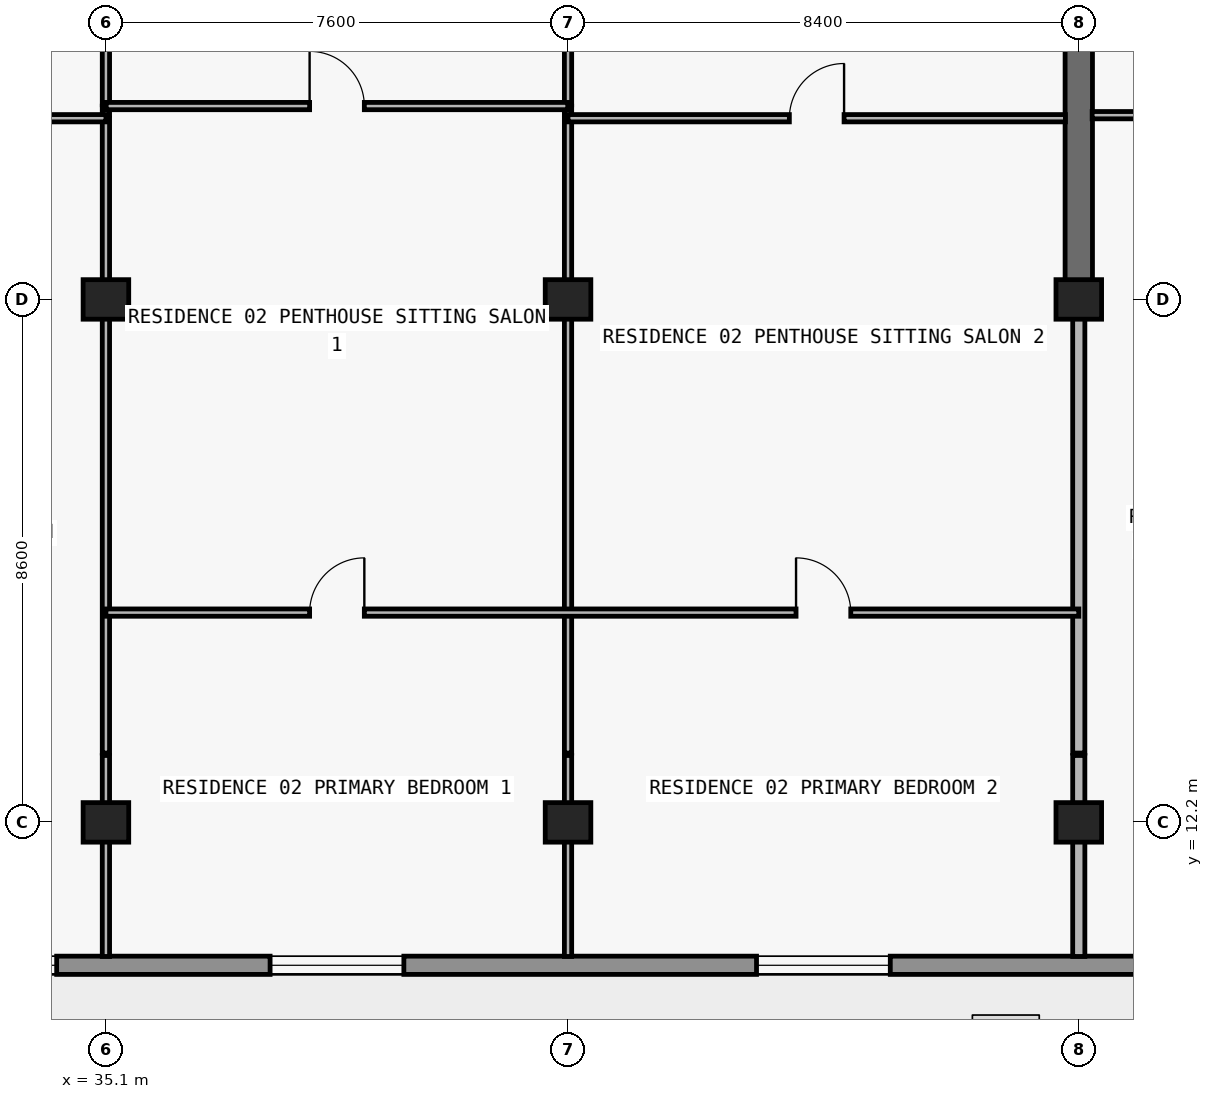
"""IFC4 building model, lengths in metres.
Left out: names, types, materials, properties, quantities, classifications, styles, units other than length and angle.
Written with IfcOpenShell. Run it as: python <this file> out.ifc"""

import sys

from ifc_helpers import new_model, si_unit, direction, frame, frame_2d, origin, origin_2d, place, context, subcontext, project, spatial, rectangle, extrude, element, fill, save


model = new_model("IFC4")
c1 = context("Model", 3, precision=1e-05, world=origin(), true_north=direction((0.0, 1.0)))
c2 = subcontext(c1, "Body", "Model", "MODEL_VIEW")
j1 = project(units=[si_unit("LENGTHUNIT", "METRE"), si_unit("PLANEANGLEUNIT", "RADIAN")], contexts=[c1])
p1 = place(None, origin())
s1 = spatial("IfcSite", under=j1, at=p1, CompositionType="ELEMENT")
p2 = place(p1, origin())
s2 = spatial("IfcBuilding", under=s1, at=p2, CompositionType="ELEMENT")
p3 = place(p2, frame((0.0, 0.0, 256.2)))
s3 = spatial("IfcBuildingStorey", under=s2, at=p3, CompositionType="ELEMENT", Elevation=256.2)
for number, where, z_axis, x_axis in (
    (1, (35.1, 12.2, 0.0), (0.0, 0.0, 1.0), (1.0, 0.0, 0.0)),
    (2, (42.7, 12.2, 0.0), (0.0, 0.0, 1.0), (1.0, 0.0, 0.0)),
    (3, (51.1, 12.2, 0.0), (0.0, 0.0, 1.0), (1.0, 0.0, 0.0)),
    (4, (35.1, 20.8, 0.0), (0.0, 0.0, 1.0), (1.0, 0.0, 0.0)),
    (5, (42.7, 20.8, 0.0), (0.0, 0.0, 1.0), (1.0, 0.0, 0.0)),
    (6, (51.1, 20.8, 0.0), (0.0, 0.0, 1.0), (1.0, 0.0, 0.0)),
):
    element("IfcColumn", number, at=place(p3, frame(where, z_axis=z_axis, x_axis=x_axis)), inside=s3, PredefinedType="COLUMN", context=c2, shape_type="SweptSolid", body=[
        extrude(rectangle(XDim=0.75, YDim=0.65, at=origin_2d()), origin(), (0.0, 0.0, 1.0), 3.05),
    ])
p4 = place(p3, frame((51.1, 20.8, 0.0), z_axis=(0.0, 0.0, 1.0), x_axis=(0.0, 1.0, 0.0)))
e7 = element("IfcWall", 7, at=p4, inside=s3, PredefinedType="SHEAR", context=c2, shape_type="SweptSolid", body=[
    extrude(rectangle(XDim=8.6, YDim=0.45, at=frame_2d((4.3, 0.0))), origin(), (0.0, 0.0, 1.0), 3.05),
])
p5 = place(p3, frame((65.7, 9.85, 0.0), z_axis=(0.0, 0.0, 1.0), x_axis=(-1.0, 0.0, 0.0)))
e8 = element("IfcWall", 8, at=p5, inside=s3, PredefinedType="STANDARD", context=c2, shape_type="SweptSolid", body=[
    extrude(rectangle(XDim=53.6, YDim=0.3, at=frame_2d((26.8, 0.0))), origin(), (0.0, 0.0, 1.0), 3.05),
])
p6 = place(p5, frame((49.5, 0.0, 0.0)))
e9 = element("IfcOpeningElement", 9, at=p6, cuts=e8, PredefinedType="OPENING", context=c2, shape_type="SweptSolid", body=[
    extrude(rectangle(XDim=2.0, YDim=2.3, at=frame_2d((1.0, 1.15))), frame((0.0, 0.16, 0.0), z_axis=(0.0, -1.0, 0.0), x_axis=(1.0, 0.0, 0.0)), (0.0, 0.0, 1.0), 0.32),
])
p7 = place(p5, frame((42.1, 0.0, 0.85)))
e10 = element("IfcOpeningElement", 10, at=p7, cuts=e8, PredefinedType="OPENING", context=c2, shape_type="SweptSolid", body=[
    extrude(rectangle(XDim=2.2, YDim=1.55, at=frame_2d((1.1, 0.775))), frame((0.0, 0.16, 0.0), z_axis=(0.0, -1.0, 0.0), x_axis=(1.0, 0.0, 0.0)), (0.0, 0.0, 1.0), 0.32),
])
p8 = place(p5, frame((36.09, 0.0, 0.0)))
e11 = element("IfcOpeningElement", 11, at=p8, cuts=e8, PredefinedType="OPENING", context=c2, shape_type="SweptSolid", body=[
    extrude(rectangle(XDim=2.0, YDim=2.3, at=frame_2d((1.0, 1.15))), frame((0.0, 0.16, 0.0), z_axis=(0.0, -1.0, 0.0), x_axis=(1.0, 0.0, 0.0)), (0.0, 0.0, 1.0), 0.32),
])
p9 = place(p5, frame((31.41, 0.0, 0.65)))
e12 = element("IfcOpeningElement", 12, at=p9, cuts=e8, PredefinedType="OPENING", context=c2, shape_type="SweptSolid", body=[
    extrude(rectangle(XDim=2.6, YDim=1.85, at=frame_2d((1.3, 0.925))), frame((0.0, 0.16, 0.0), z_axis=(0.0, -1.0, 0.0), x_axis=(1.0, 0.0, 0.0)), (0.0, 0.0, 1.0), 0.32),
])
p10 = place(p5, frame((25.7, 0.0, 0.85)))
e13 = element("IfcOpeningElement", 13, at=p10, cuts=e8, PredefinedType="OPENING", context=c2, shape_type="SweptSolid", body=[
    extrude(rectangle(XDim=2.2, YDim=1.55, at=frame_2d((1.1, 0.775))), frame((0.0, 0.16, 0.0), z_axis=(0.0, -1.0, 0.0), x_axis=(1.0, 0.0, 0.0)), (0.0, 0.0, 1.0), 0.32),
])
p11 = place(p5, frame((17.7, 0.0, 0.85)))
e14 = element("IfcOpeningElement", 14, at=p11, cuts=e8, PredefinedType="OPENING", context=c2, shape_type="SweptSolid", body=[
    extrude(rectangle(XDim=2.2, YDim=1.55, at=frame_2d((1.1, 0.775))), frame((0.0, 0.16, 0.0), z_axis=(0.0, -1.0, 0.0), x_axis=(1.0, 0.0, 0.0)), (0.0, 0.0, 1.0), 0.32),
])
p12 = place(p5, frame((11.626, 0.0, 0.0)))
e15 = element("IfcOpeningElement", 15, at=p12, cuts=e8, PredefinedType="OPENING", context=c2, shape_type="SweptSolid", body=[
    extrude(rectangle(XDim=2.0, YDim=2.3, at=frame_2d((1.0, 1.15))), frame((0.0, 0.16, 0.0), z_axis=(0.0, -1.0, 0.0), x_axis=(1.0, 0.0, 0.0)), (0.0, 0.0, 1.0), 0.32),
])
p13 = place(p5, frame((7.326, 0.0, 0.85)))
e16 = element("IfcOpeningElement", 16, at=p13, cuts=e8, PredefinedType="OPENING", context=c2, shape_type="SweptSolid", body=[
    extrude(rectangle(XDim=2.2, YDim=1.55, at=frame_2d((1.1, 0.775))), frame((0.0, 0.16, 0.0), z_axis=(0.0, -1.0, 0.0), x_axis=(1.0, 0.0, 0.0)), (0.0, 0.0, 1.0), 0.32),
])
p14 = place(p3, frame((35.1, 9.995, 0.0), z_axis=(0.0, 0.0, 1.0), x_axis=(0.0, 1.0, 0.0)))
e17 = element("IfcWall", 17, at=p14, inside=s3, PredefinedType="PARTITIONING", context=c2, shape_type="SweptSolid", body=[
    extrude(rectangle(XDim=3.305, YDim=0.12, at=frame_2d((1.652, 0.0))), origin(), (0.0, 0.0, 1.0), 2.263),
])
p15 = place(p3, frame((35.1, 13.34, 0.0), z_axis=(0.0, 0.0, 1.0), x_axis=(0.0, 1.0, 0.0)))
e18 = element("IfcWall", 18, at=p15, inside=s3, PredefinedType="PARTITIONING", context=c2, shape_type="SweptSolid", body=[
    extrude(rectangle(XDim=10.44, YDim=0.12, at=frame_2d((5.22, 0.0))), origin(), (0.0, 0.0, 1.0), 2.263),
])
p16 = place(p3, frame((35.1, 23.83, 0.0), z_axis=(0.0, 0.0, 1.0), x_axis=(0.0, 1.0, 0.0)))
e19 = element("IfcWall", 19, at=p16, inside=s3, PredefinedType="PARTITIONING", context=c2, shape_type="SweptSolid", body=[
    extrude(rectangle(XDim=0.15, YDim=0.12, at=frame_2d((0.075, 0.0))), origin(), (0.0, 0.0, 1.0), 2.263),
])
p17 = place(p3, frame((35.1, 24.0, 0.0), z_axis=(0.0, 0.0, 1.0), x_axis=(0.0, 1.0, 0.0)))
e20 = element("IfcWall", 20, at=p17, inside=s3, PredefinedType="PARTITIONING", context=c2, shape_type="SweptSolid", body=[
    extrude(rectangle(XDim=4.58, YDim=0.12, at=frame_2d((2.29, 0.0))), origin(), (0.0, 0.0, 1.0), 2.263),
])
p18 = place(p17, frame((1.74, 0.0, 0.0)))
e21 = element("IfcOpeningElement", 21, at=p18, cuts=e20, PredefinedType="OPENING", context=c2, shape_type="SweptSolid", body=[
    extrude(rectangle(XDim=0.9, YDim=2.15, at=frame_2d((0.45, 1.075))), frame((0.0, 0.07, 0.0), z_axis=(0.0, -1.0, 0.0), x_axis=(1.0, 0.0, 0.0)), (0.0, 0.0, 1.0), 0.14),
])
p19 = place(p3, frame((42.7, 9.995, 0.0), z_axis=(0.0, 0.0, 1.0), x_axis=(0.0, 1.0, 0.0)))
e22 = element("IfcWall", 22, at=p19, inside=s3, PredefinedType="PARTITIONING", context=c2, shape_type="SweptSolid", body=[
    extrude(rectangle(XDim=3.305, YDim=0.12, at=frame_2d((1.652, 0.0))), origin(), (0.0, 0.0, 1.0), 2.263),
])
p20 = place(p3, frame((42.7, 13.34, 0.0), z_axis=(0.0, 0.0, 1.0), x_axis=(0.0, 1.0, 0.0)))
e23 = element("IfcWall", 23, at=p20, inside=s3, PredefinedType="PARTITIONING", context=c2, shape_type="SweptSolid", body=[
    extrude(rectangle(XDim=10.44, YDim=0.12, at=frame_2d((5.22, 0.0))), origin(), (0.0, 0.0, 1.0), 2.263),
])
p21 = place(p3, frame((42.7, 23.83, 0.0), z_axis=(0.0, 0.0, 1.0), x_axis=(0.0, 1.0, 0.0)))
e24 = element("IfcWall", 24, at=p21, inside=s3, PredefinedType="PARTITIONING", context=c2, shape_type="SweptSolid", body=[
    extrude(rectangle(XDim=0.15, YDim=0.12, at=frame_2d((0.075, 0.0))), origin(), (0.0, 0.0, 1.0), 2.263),
])
p22 = place(p3, frame((42.7, 24.0, 0.0), z_axis=(0.0, 0.0, 1.0), x_axis=(0.0, 1.0, 0.0)))
e25 = element("IfcWall", 25, at=p22, inside=s3, PredefinedType="PARTITIONING", context=c2, shape_type="SweptSolid", body=[
    extrude(rectangle(XDim=4.58, YDim=0.12, at=frame_2d((2.29, 0.0))), origin(), (0.0, 0.0, 1.0), 2.263),
])
p23 = place(p22, frame((1.74, 0.0, 0.0)))
e26 = element("IfcOpeningElement", 26, at=p23, cuts=e25, PredefinedType="OPENING", context=c2, shape_type="SweptSolid", body=[
    extrude(rectangle(XDim=0.9, YDim=2.15, at=frame_2d((0.45, 1.075))), frame((0.0, 0.07, 0.0), z_axis=(0.0, -1.0, 0.0), x_axis=(1.0, 0.0, 0.0)), (0.0, 0.0, 1.0), 0.14),
])
p24 = place(p3, frame((51.1, 9.995, 0.0), z_axis=(0.0, 0.0, 1.0), x_axis=(0.0, 1.0, 0.0)))
e27 = element("IfcWall", 27, at=p24, inside=s3, PredefinedType="PARTITIONING", context=c2, shape_type="SweptSolid", body=[
    extrude(rectangle(XDim=3.305, YDim=0.2, at=frame_2d((1.652, 0.0))), origin(), (0.0, 0.0, 1.0), 2.263),
])
p25 = place(p3, frame((51.1, 13.34, 0.0), z_axis=(0.0, 0.0, 1.0), x_axis=(0.0, 1.0, 0.0)))
e28 = element("IfcWall", 28, at=p25, inside=s3, PredefinedType="PARTITIONING", context=c2, shape_type="SweptSolid", body=[
    extrude(rectangle(XDim=7.455, YDim=0.2, at=frame_2d((3.728, 0.0))), origin(), (0.0, 0.0, 1.0), 2.263),
])
p26 = place(p3, frame((35.1, 15.65, 0.0), z_axis=(0.0, 0.0, 1.0), x_axis=(1.0, 0.0, 0.0)))
e29 = element("IfcWall", 29, at=p26, inside=s3, PredefinedType="PARTITIONING", context=c2, shape_type="SweptSolid", body=[
    extrude(rectangle(XDim=16.0, YDim=0.12, at=frame_2d((8.0, 0.0))), origin(), (0.0, 0.0, 1.0), 3.05),
])
p27 = place(p26, frame((3.35, 0.0, 0.0)))
e30 = element("IfcOpeningElement", 30, at=p27, cuts=e29, PredefinedType="OPENING", context=c2, shape_type="SweptSolid", body=[
    extrude(rectangle(XDim=0.9, YDim=2.15, at=frame_2d((0.45, 1.075))), frame((0.0, 0.07, 0.0), z_axis=(0.0, -1.0, 0.0), x_axis=(1.0, 0.0, 0.0)), (0.0, 0.0, 1.0), 0.14),
])
p28 = place(p26, frame((11.35, 0.0, 0.0)))
e31 = element("IfcOpeningElement", 31, at=p28, cuts=e29, PredefinedType="OPENING", context=c2, shape_type="SweptSolid", body=[
    extrude(rectangle(XDim=0.9, YDim=2.15, at=frame_2d((0.45, 1.075))), frame((0.0, 0.07, 0.0), z_axis=(0.0, -1.0, 0.0), x_axis=(1.0, 0.0, 0.0)), (0.0, 0.0, 1.0), 0.14),
])
p29 = place(p3, frame((26.92, 23.78, 0.0), z_axis=(0.0, 0.0, 1.0), x_axis=(1.0, 0.0, 0.0)))
e32 = element("IfcWall", 32, at=p29, inside=s3, PredefinedType="PARTITIONING", context=c2, shape_type="SweptSolid", body=[
    extrude(rectangle(XDim=8.18, YDim=0.12, at=frame_2d((4.09, 0.0))), origin(), (0.0, 0.0, 1.0), 3.05),
])
p30 = place(p29, frame((1.204, 0.0, 0.0)))
e33 = element("IfcOpeningElement", 33, at=p30, cuts=e32, PredefinedType="OPENING", context=c2, shape_type="SweptSolid", body=[
    extrude(rectangle(XDim=0.9, YDim=2.15, at=frame_2d((0.45, 1.075))), frame((0.0, 0.07, 0.0), z_axis=(0.0, -1.0, 0.0), x_axis=(1.0, 0.0, 0.0)), (0.0, 0.0, 1.0), 0.14),
])
p31 = place(p3, frame((42.7, 23.78, 0.0), z_axis=(0.0, 0.0, 1.0), x_axis=(1.0, 0.0, 0.0)))
e34 = element("IfcWall", 34, at=p31, inside=s3, PredefinedType="PARTITIONING", context=c2, shape_type="SweptSolid", body=[
    extrude(rectangle(XDim=8.18, YDim=0.12, at=frame_2d((4.09, 0.0))), origin(), (0.0, 0.0, 1.0), 3.05),
])
p32 = place(p31, frame((3.64, 0.0, 0.0)))
e35 = element("IfcOpeningElement", 35, at=p32, cuts=e34, PredefinedType="OPENING", context=c2, shape_type="SweptSolid", body=[
    extrude(rectangle(XDim=0.9, YDim=2.15, at=frame_2d((0.45, 1.075))), frame((0.0, 0.07, 0.0), z_axis=(0.0, -1.0, 0.0), x_axis=(1.0, 0.0, 0.0)), (0.0, 0.0, 1.0), 0.14),
])
p33 = place(p3, frame((51.32, 23.83, 0.0), z_axis=(0.0, 0.0, 1.0), x_axis=(1.0, 0.0, 0.0)))
e36 = element("IfcWall", 36, at=p33, inside=s3, PredefinedType="PARTITIONING", context=c2, shape_type="SweptSolid", body=[
    extrude(rectangle(XDim=8.18, YDim=0.12, at=frame_2d((4.09, 0.0))), origin(), (0.0, 0.0, 1.0), 3.05),
])
p34 = place(p33, frame((1.414, 0.0, 0.0)))
e37 = element("IfcOpeningElement", 37, at=p34, cuts=e36, PredefinedType="OPENING", context=c2, shape_type="SweptSolid", body=[
    extrude(rectangle(XDim=0.9, YDim=2.15, at=frame_2d((0.45, 1.075))), frame((0.0, 0.07, 0.0), z_axis=(0.0, -1.0, 0.0), x_axis=(1.0, 0.0, 0.0)), (0.0, 0.0, 1.0), 0.14),
])
p35 = place(p33, frame((5.798, 0.0, 0.0)))
e38 = element("IfcOpeningElement", 38, at=p35, cuts=e36, PredefinedType="OPENING", context=c2, shape_type="SweptSolid", body=[
    extrude(rectangle(XDim=0.9, YDim=2.15, at=frame_2d((0.45, 1.075))), frame((0.0, 0.07, 0.0), z_axis=(0.0, -1.0, 0.0), x_axis=(1.0, 0.0, 0.0)), (0.0, 0.0, 1.0), 0.14),
])
p36 = place(p3, frame((35.105, 23.98, 0.0), z_axis=(0.0, 0.0, 1.0), x_axis=(1.0, 0.0, 0.0)))
e39 = element("IfcWall", 39, at=p36, inside=s3, PredefinedType="PARTITIONING", context=c2, shape_type="SweptSolid", body=[
    extrude(rectangle(XDim=7.59, YDim=0.12, at=frame_2d((3.795, 0.0))), origin(), (0.0, 0.0, 1.0), 3.05),
])
p37 = place(p36, frame((3.345, 0.0, 0.0)))
e40 = element("IfcOpeningElement", 40, at=p37, cuts=e39, PredefinedType="OPENING", context=c2, shape_type="SweptSolid", body=[
    extrude(rectangle(XDim=0.9, YDim=2.15, at=frame_2d((0.45, 1.075))), frame((0.0, 0.07, 0.0), z_axis=(0.0, -1.0, 0.0), x_axis=(1.0, 0.0, 0.0)), (0.0, 0.0, 1.0), 0.14),
])
p38 = place(p9, origin())
e41 = element("IfcWindow", 41, at=p38, inside=s3, PartitioningType="SINGLE_PANEL", PredefinedType="WINDOW", context=c2, shape_type="SweptSolid", body=[
    extrude(rectangle(XDim=2.6, YDim=1.85, at=frame_2d((1.3, 0.925))), frame((0.0, 0.03, 0.0), z_axis=(0.0, -1.0, 0.0), x_axis=(1.0, 0.0, 0.0)), (0.0, 0.0, 1.0), 0.06),
])
fill(e12, e41)
p39 = place(p10, origin())
e42 = element("IfcWindow", 42, at=p39, inside=s3, PartitioningType="SINGLE_PANEL", PredefinedType="WINDOW", context=c2, shape_type="SweptSolid", body=[
    extrude(rectangle(XDim=2.2, YDim=1.55, at=frame_2d((1.1, 0.775))), frame((0.0, 0.03, 0.0), z_axis=(0.0, -1.0, 0.0), x_axis=(1.0, 0.0, 0.0)), (0.0, 0.0, 1.0), 0.06),
])
fill(e13, e42)
p40 = place(p11, origin())
e43 = element("IfcWindow", 43, at=p40, inside=s3, PartitioningType="SINGLE_PANEL", PredefinedType="WINDOW", context=c2, shape_type="SweptSolid", body=[
    extrude(rectangle(XDim=2.2, YDim=1.55, at=frame_2d((1.1, 0.775))), frame((0.0, 0.03, 0.0), z_axis=(0.0, -1.0, 0.0), x_axis=(1.0, 0.0, 0.0)), (0.0, 0.0, 1.0), 0.06),
])
fill(e14, e43)
p41 = place(p37, origin())
e44 = element("IfcDoor", 44, at=p41, inside=s3, OperationType="SINGLE_SWING_LEFT", PredefinedType="DOOR", context=c2, shape_type="SweptSolid", body=[
    extrude(rectangle(XDim=0.9, YDim=2.15, at=frame_2d((0.45, 1.075))), frame((0.0, 0.025, 0.0), z_axis=(0.0, -1.0, 0.0), x_axis=(1.0, 0.0, 0.0)), (0.0, 0.0, 1.0), 0.05),
])
fill(e40, e44)
p42 = place(p27, origin())
e45 = element("IfcDoor", 45, at=p42, inside=s3, OperationType="SINGLE_SWING_RIGHT", PredefinedType="DOOR", context=c2, shape_type="SweptSolid", body=[
    extrude(rectangle(XDim=0.9, YDim=2.15, at=frame_2d((0.45, 1.075))), frame((0.0, 0.025, 0.0), z_axis=(0.0, -1.0, 0.0), x_axis=(1.0, 0.0, 0.0)), (0.0, 0.0, 1.0), 0.05),
])
fill(e30, e45)
p43 = place(p32, origin())
e46 = element("IfcDoor", 46, at=p43, inside=s3, OperationType="SINGLE_SWING_RIGHT", PredefinedType="DOOR", context=c2, shape_type="SweptSolid", body=[
    extrude(rectangle(XDim=0.9, YDim=2.15, at=frame_2d((0.45, 1.075))), frame((0.0, 0.025, 0.0), z_axis=(0.0, -1.0, 0.0), x_axis=(1.0, 0.0, 0.0)), (0.0, 0.0, 1.0), 0.05),
])
fill(e35, e46)
p44 = place(p28, origin())
e47 = element("IfcDoor", 47, at=p44, inside=s3, OperationType="SINGLE_SWING_LEFT", PredefinedType="DOOR", context=c2, shape_type="SweptSolid", body=[
    extrude(rectangle(XDim=0.9, YDim=2.15, at=frame_2d((0.45, 1.075))), frame((0.0, 0.025, 0.0), z_axis=(0.0, -1.0, 0.0), x_axis=(1.0, 0.0, 0.0)), (0.0, 0.0, 1.0), 0.05),
])
fill(e31, e47)
save(model, sys.argv[1])
